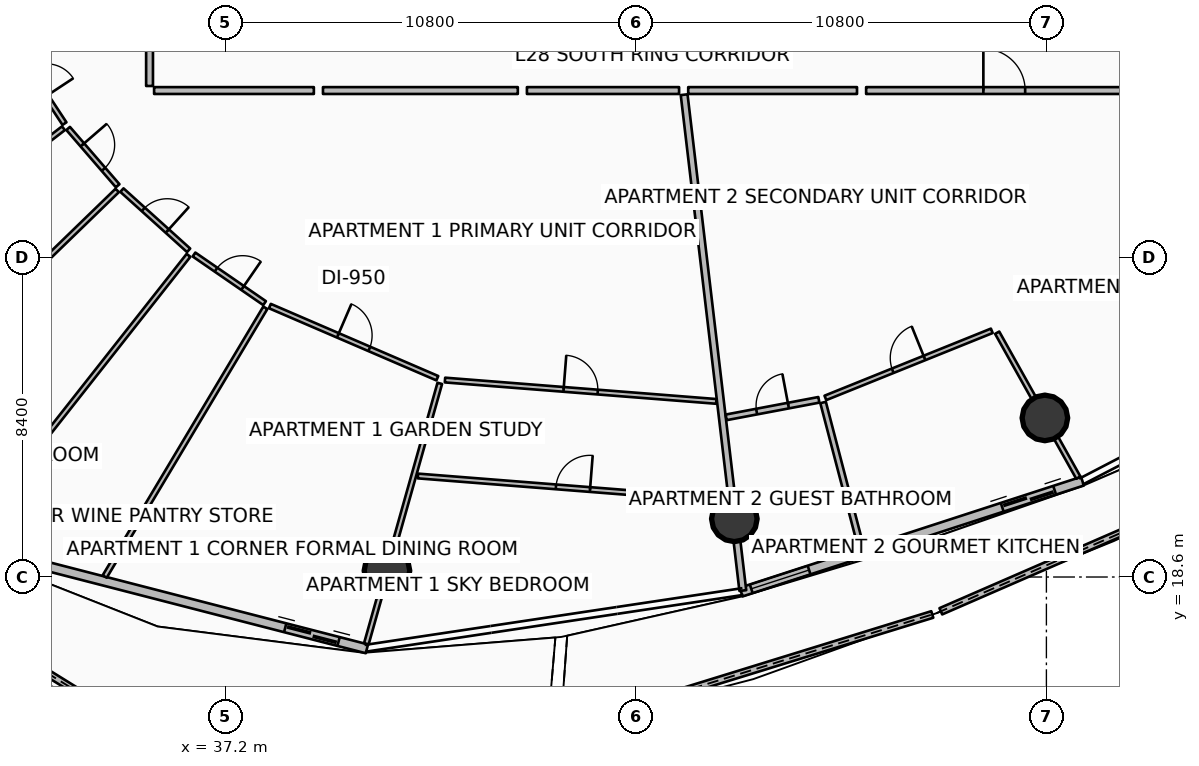
"""IFC4 building model, lengths in metres.
Left out: names, types, materials, properties, quantities, classifications, styles, units other than length and angle.
Written with IfcOpenShell. Run it as: python <this file> out.ifc"""

import sys

from ifc_helpers import new_model, si_unit, direction, frame, frame_2d, origin, origin_2d, place, context, subcontext, project, spatial, polyline, rectangle, circle, outline, extrude, element, fill, save


model = new_model("IFC4")
c1 = context("Model", 3, precision=1e-05, world=origin(), true_north=direction((0.0, 1.0)))
c2 = subcontext(c1, "Body", "Model", "MODEL_VIEW")
j1 = project(units=[si_unit("LENGTHUNIT", "METRE"), si_unit("PLANEANGLEUNIT", "RADIAN")], contexts=[c1])
p1 = place(None, origin())
s1 = spatial("IfcSite", under=j1, at=p1, CompositionType="ELEMENT")
p2 = place(p1, origin())
s2 = spatial("IfcBuilding", under=s1, at=p2, CompositionType="ELEMENT")
p3 = place(p2, frame((0.0, 0.0, 112.65)))
s3 = spatial("IfcBuildingStorey", under=s2, at=p3, CompositionType="ELEMENT", Elevation=112.65)
p4 = place(p3, frame((31.677, 21.294, 0.0), z_axis=(0.198457488994, 0.251703806559, 0.947237994818), x_axis=(-0.785271109582, 0.619152068926, 0.0)))
e1 = element("IfcColumn", 1, at=p4, inside=s3, PredefinedType="COLUMN", context=c2, shape_type="SweptSolid", body=[
    extrude(circle(Radius=0.6, at=origin_2d()), origin(), (0.0, 0.0, 1.0), 3.664),
])
p5 = place(p3, frame((41.447, 18.766, 0.0), z_axis=(0.080372181919, 0.284864280229, 0.955192469727), x_axis=(-0.962426857869, 0.271541052609, 0.0)))
e2 = element("IfcColumn", 2, at=p5, inside=s3, PredefinedType="COLUMN", context=c2, shape_type="SweptSolid", body=[
    extrude(circle(Radius=0.6, at=origin_2d()), origin(), (0.0, 0.0, 1.0), 3.633),
])
for number, where, z_axis, x_axis in (
    (3, (50.588, 20.131, 0.0), (-0.032, 0.27, 0.962), (-0.993, -0.118, 0.0)),
    (4, (58.76, 22.786, 0.0), (-0.133, 0.237, 0.962), (-0.872, -0.489, 0.0)),
):
    element("IfcColumn", number, at=place(p3, frame(where, z_axis=z_axis, x_axis=x_axis)), inside=s3, PredefinedType="COLUMN", context=c2, shape_type="SweptSolid", body=[
        extrude(circle(Radius=0.6, at=origin_2d()), origin(), (0.0, 0.0, 1.0), 3.606),
    ])
p6 = place(p3, frame((24.065, 21.303, 0.0), z_axis=(0.0, 0.0, 1.0), x_axis=(0.850140442318, -0.526556006836, 0.0)))
e5 = element("IfcWall", 5, at=p6, inside=s3, PredefinedType="PARAPET", context=c2, shape_type="SweptSolid", body=[
    extrude(outline(polyline([(0.0, 0.0), (11.852, 0.0), (11.852, 1.832), (5.926, 1.696), (0.0, 1.497), (0.0, 0.0)])), frame((0.0, 0.09, 0.0), z_axis=(0.0, -1.0, 0.0), x_axis=(1.0, 0.0, 0.0)), (0.0, 0.0, 1.0), 0.18),
])
p7 = place(p3, frame((46.011, 14.594, 0.0), z_axis=(0.0, 0.0, 1.0), x_axis=(0.955530222606, 0.294893190301, 0.0)))
e6 = element("IfcWall", 6, at=p7, inside=s3, PredefinedType="PARAPET", context=c2, shape_type="SweptSolid", body=[
    extrude(outline(polyline([(0.0, 0.0), (10.241, 0.0), (10.241, 1.348), (5.121, 1.562), (0.0, 1.747), (0.0, 0.0)])), frame((0.0, 0.09, 0.0), z_axis=(0.0, -1.0, 0.0), x_axis=(1.0, 0.0, 0.0)), (0.0, 0.0, 1.0), 0.18),
])
p8 = place(p3, frame((56.022, 17.698, 0.0), z_axis=(0.0, 0.0, 1.0), x_axis=(0.916910512906, 0.399092860527, 0.0)))
e7 = element("IfcWall", 7, at=p8, inside=s3, PredefinedType="PARAPET", context=c2, shape_type="SweptSolid", body=[
    extrude(outline(polyline([(0.0, 0.0), (9.955, 0.0), (9.955, 1.12), (4.977, 1.182), (0.0, 1.348), (0.0, 0.0)])), frame((0.0, 0.09, 0.0), z_axis=(0.0, -1.0, 0.0), x_axis=(1.0, 0.0, 0.0)), (0.0, 0.0, 1.0), 0.18),
])
p9 = place(p3, frame((30.186, 19.477, 0.0), z_axis=(0.0, 0.0, 1.0), x_axis=(0.968356180858, -0.249572248045, 0.0)))
e8 = element("IfcWall", 8, at=p9, inside=s3, PredefinedType="SOLIDWALL", context=c2, shape_type="SweptSolid", body=[
    extrude(rectangle(XDim=11.084, YDim=0.24, at=frame_2d((5.542, 0.0))), origin(), (0.0, 0.0, 1.0), 2.42),
])
p10 = place(p9, frame((8.865, 0.0, 0.0)))
e9 = element("IfcOpeningElement", 9, at=p10, cuts=e8, PredefinedType="OPENING", context=c2, shape_type="SweptSolid", body=[
    extrude(rectangle(XDim=1.45, YDim=2.15, at=frame_2d((0.725, 1.075))), frame((0.0, 0.13, 0.0), z_axis=(0.0, -1.0, 0.0), x_axis=(1.0, 0.0, 0.0)), (0.0, 0.0, 1.0), 0.26),
])
p11 = place(p9, frame((0.28, 0.0, 0.65)))
e10 = element("IfcOpeningElement", 10, at=p11, cuts=e8, PredefinedType="OPENING", context=c2, shape_type="SweptSolid", body=[
    extrude(rectangle(XDim=1.6, YDim=1.5, at=frame_2d((0.8, 0.75))), frame((0.0, 0.13, 0.0), z_axis=(0.0, -1.0, 0.0), x_axis=(1.0, 0.0, 0.0)), (0.0, 0.0, 1.0), 0.26),
])
p12 = place(p3, frame((50.767, 18.203, 0.0), z_axis=(0.0, 0.0, 1.0), x_axis=(0.951052494852, 0.30902937083, 0.0)))
e11 = element("IfcWall", 11, at=p12, inside=s3, PredefinedType="SOLIDWALL", context=c2, shape_type="SweptSolid", body=[
    extrude(rectangle(XDim=9.444, YDim=0.24, at=frame_2d((4.722, 0.0))), origin(), (0.0, 0.0, 1.0), 2.42),
])
p13 = place(p12, frame((7.224, 0.0, 0.0)))
e12 = element("IfcOpeningElement", 12, at=p13, cuts=e11, PredefinedType="OPENING", context=c2, shape_type="SweptSolid", body=[
    extrude(rectangle(XDim=1.45, YDim=2.15, at=frame_2d((0.725, 1.075))), frame((0.0, 0.13, 0.0), z_axis=(0.0, -1.0, 0.0), x_axis=(1.0, 0.0, 0.0)), (0.0, 0.0, 1.0), 0.26),
])
p14 = place(p12, frame((0.28, 0.0, 0.65)))
e13 = element("IfcOpeningElement", 13, at=p14, cuts=e11, PredefinedType="OPENING", context=c2, shape_type="SweptSolid", body=[
    extrude(rectangle(XDim=1.6, YDim=1.5, at=frame_2d((0.8, 0.75))), frame((0.0, 0.13, 0.0), z_axis=(0.0, -1.0, 0.0), x_axis=(1.0, 0.0, 0.0)), (0.0, 0.0, 1.0), 0.26),
])
p15 = place(p3, frame((49.268, 31.291, 0.0), z_axis=(0.0, 0.0, 1.0), x_axis=(0.117532311618, -0.993069058891, 0.0)))
e14 = element("IfcWall", 14, at=p15, inside=s3, PredefinedType="PARTITIONING", context=c2, shape_type="SweptSolid", body=[
    extrude(rectangle(XDim=13.138, YDim=0.18, at=frame_2d((6.569, 0.0))), origin(), (0.0, 0.0, 1.0), 2.427),
])
p16 = place(p3, frame((35.2, 34.712, 0.0), z_axis=(0.0, 0.0, 1.0), x_axis=(0.0, -1.0, 0.0)))
e15 = element("IfcWall", 15, at=p16, inside=s3, PredefinedType="PARTITIONING", context=c2, shape_type="SweptSolid", body=[
    extrude(rectangle(XDim=3.192, YDim=0.18, at=frame_2d((1.596, 0.0))), origin(), (0.0, 0.0, 1.0), 2.427),
])
p17 = place(p3, frame((35.32, 31.4, 0.0), z_axis=(0.0, 0.0, 1.0), x_axis=(1.0, 0.0, 0.0)))
e16 = element("IfcWall", 16, at=p17, inside=s3, PredefinedType="PARTITIONING", context=c2, shape_type="SweptSolid", body=[
    extrude(rectangle(XDim=4.204, YDim=0.18, at=frame_2d((2.102, 0.0))), origin(), (0.0, 0.0, 1.0), 2.427),
])
p18 = place(p3, frame((32.934, 30.408, 0.0), z_axis=(0.0, 0.0, 1.0), x_axis=(-0.792552954037, -0.609803095308, 0.0)))
e17 = element("IfcWall", 17, at=p18, inside=s3, PredefinedType="PARTITIONING", context=c2, shape_type="SweptSolid", body=[
    extrude(rectangle(XDim=10.094, YDim=0.125, at=frame_2d((5.047, 0.0))), origin(), (0.0, 0.0, 1.0), 2.445),
])
p19 = place(p3, frame((34.349, 28.771, 0.0), z_axis=(0.0, 0.0, 1.0), x_axis=(-0.718111331478, -0.695928240268, 0.0)))
e18 = element("IfcWall", 18, at=p19, inside=s3, PredefinedType="PARTITIONING", context=c2, shape_type="SweptSolid", body=[
    extrude(rectangle(XDim=9.674, YDim=0.125, at=frame_2d((4.837, 0.0))), origin(), (0.0, 0.0, 1.0), 2.445),
])
p20 = place(p3, frame((31.537, 32.689, 0.0), z_axis=(0.0, 0.0, 1.0), x_axis=(0.550619938064, -0.834756062455, 0.0)))
e19 = element("IfcWall", 19, at=p20, inside=s3, PredefinedType="PARTITIONING", context=c2, shape_type="SweptSolid", body=[
    extrude(rectangle(XDim=2.586, YDim=0.125, at=frame_2d((1.293, 0.0))), origin(), (0.0, 0.0, 1.0), 2.427),
])
p21 = place(p20, frame((0.868, 0.0, 0.0)))
e20 = element("IfcOpeningElement", 20, at=p21, cuts=e19, PredefinedType="OPENING", context=c2, shape_type="SweptSolid", body=[
    extrude(rectangle(XDim=0.85, YDim=2.06, at=frame_2d((0.425, 1.03))), frame((0.0, 0.073, 0.0), z_axis=(0.0, -1.0, 0.0), x_axis=(1.0, 0.0, 0.0)), (0.0, 0.0, 1.0), 0.145),
])
p22 = place(p3, frame((33.058, 30.403, 0.0), z_axis=(0.0, 0.0, 1.0), x_axis=(0.653992855141, -0.756500724008, 0.0)))
e21 = element("IfcWall", 21, at=p22, inside=s3, PredefinedType="PARTITIONING", context=c2, shape_type="SweptSolid", body=[
    extrude(rectangle(XDim=1.993, YDim=0.125, at=frame_2d((0.997, 0.0))), origin(), (0.0, 0.0, 1.0), 2.91),
])
p23 = place(p22, frame((0.572, 0.0, 0.0)))
e22 = element("IfcOpeningElement", 22, at=p23, cuts=e21, PredefinedType="OPENING", context=c2, shape_type="SweptSolid", body=[
    extrude(rectangle(XDim=0.85, YDim=2.06, at=frame_2d((0.425, 1.03))), frame((0.0, 0.073, 0.0), z_axis=(0.0, -1.0, 0.0), x_axis=(1.0, 0.0, 0.0)), (0.0, 0.0, 1.0), 0.145),
])
p24 = place(p3, frame((34.473, 28.781, 0.0), z_axis=(0.0, 0.0, 1.0), x_axis=(0.742276601868, -0.670093610117, 0.0)))
e23 = element("IfcWall", 23, at=p24, inside=s3, PredefinedType="PARTITIONING", context=c2, shape_type="SweptSolid", body=[
    extrude(rectangle(XDim=2.364, YDim=0.125, at=frame_2d((1.182, 0.0))), origin(), (0.0, 0.0, 1.0), 2.427),
])
p25 = place(p24, frame((0.757, 0.0, 0.0)))
e24 = element("IfcOpeningElement", 24, at=p25, cuts=e23, PredefinedType="OPENING", context=c2, shape_type="SweptSolid", body=[
    extrude(rectangle(XDim=0.85, YDim=2.06, at=frame_2d((0.425, 1.03))), frame((0.0, 0.073, 0.0), z_axis=(0.0, -1.0, 0.0), x_axis=(1.0, 0.0, 0.0)), (0.0, 0.0, 1.0), 0.145),
])
p26 = place(p3, frame((39.764, 31.4, 0.0), z_axis=(0.0, 0.0, 1.0), x_axis=(1.0, 0.0, 0.0)))
e25 = element("IfcWall", 25, at=p26, inside=s3, PredefinedType="PARTITIONING", context=c2, shape_type="SweptSolid", body=[
    extrude(rectangle(XDim=5.127, YDim=0.18, at=frame_2d((2.563, 0.0))), origin(), (0.0, 0.0, 1.0), 2.427),
])
p27 = place(p3, frame((36.226, 27.064, 0.0), z_axis=(0.0, 0.0, 1.0), x_axis=(-0.619089743422, -0.785320246517, 0.0)))
e26 = element("IfcWall", 26, at=p27, inside=s3, PredefinedType="PARTITIONING", context=c2, shape_type="SweptSolid", body=[
    extrude(rectangle(XDim=9.652, YDim=0.125, at=frame_2d((4.826, 0.0))), origin(), (0.0, 0.0, 1.0), 2.427),
])
p28 = place(p3, frame((38.247, 25.684, 0.0), z_axis=(0.0, 0.0, 1.0), x_axis=(-0.51308300355, -0.858338995658, 0.0)))
e27 = element("IfcWall", 27, at=p28, inside=s3, PredefinedType="PARTITIONING", context=c2, shape_type="SweptSolid", body=[
    extrude(rectangle(XDim=8.238, YDim=0.125, at=frame_2d((4.119, 0.0))), origin(), (0.0, 0.0, 1.0), 2.445),
])
p29 = place(p3, frame((36.37, 27.086, 0.0), z_axis=(0.0, 0.0, 1.0), x_axis=(0.823491864383, -0.567328079065, 0.0)))
e28 = element("IfcWall", 28, at=p29, inside=s3, PredefinedType="PARTITIONING", context=c2, shape_type="SweptSolid", body=[
    extrude(rectangle(XDim=2.255, YDim=0.125, at=frame_2d((1.127, 0.0))), origin(), (0.0, 0.0, 1.0), 2.427),
])
p30 = place(p29, frame((0.702, 0.0, 0.0)))
e29 = element("IfcOpeningElement", 29, at=p30, cuts=e28, PredefinedType="OPENING", context=c2, shape_type="SweptSolid", body=[
    extrude(rectangle(XDim=0.85, YDim=2.06, at=frame_2d((0.425, 1.03))), frame((0.0, 0.073, 0.0), z_axis=(0.0, -1.0, 0.0), x_axis=(1.0, 0.0, 0.0)), (0.0, 0.0, 1.0), 0.145),
])
p31 = place(p3, frame((38.366, 25.729, 0.0), z_axis=(0.0, 0.0, 1.0), x_axis=(0.918374782562, -0.395711711673, 0.0)))
e30 = element("IfcWall", 30, at=p31, inside=s3, PredefinedType="PARTITIONING", context=c2, shape_type="SweptSolid", body=[
    extrude(rectangle(XDim=4.798, YDim=0.125, at=frame_2d((2.399, 0.0))), origin(), (0.0, 0.0, 1.0), 2.427),
])
p32 = place(p31, frame((1.949, 0.0, 0.0)))
e31 = element("IfcOpeningElement", 31, at=p32, cuts=e30, PredefinedType="OPENING", context=c2, shape_type="SweptSolid", body=[
    extrude(rectangle(XDim=0.9, YDim=2.08, at=frame_2d((0.45, 1.04))), frame((0.0, 0.073, 0.0), z_axis=(0.0, -1.0, 0.0), x_axis=(1.0, 0.0, 0.0)), (0.0, 0.0, 1.0), 0.145),
])
p33 = place(p3, frame((45.131, 31.4, 0.0), z_axis=(0.0, 0.0, 1.0), x_axis=(1.0, 0.0, 0.0)))
e32 = element("IfcWall", 32, at=p33, inside=s3, PredefinedType="PARTITIONING", context=c2, shape_type="SweptSolid", body=[
    extrude(rectangle(XDim=4.004, YDim=0.18, at=frame_2d((2.002, 0.0))), origin(), (0.0, 0.0, 1.0), 2.427),
])
p34 = place(p3, frame((42.837, 23.695, 0.0), z_axis=(0.0, 0.0, 1.0), x_axis=(-0.271444688389, -0.962454041056, 0.0)))
e33 = element("IfcWall", 33, at=p34, inside=s3, PredefinedType="PARTITIONING", context=c2, shape_type="SweptSolid", body=[
    extrude(rectangle(XDim=7.119, YDim=0.125, at=frame_2d((3.56, 0.0))), origin(), (0.0, 0.0, 1.0), 2.427),
])
p35 = place(p3, frame((42.974, 23.783, 0.0), z_axis=(0.0, 0.0, 1.0), x_axis=(0.996916140978, -0.078474249642, 0.0)))
e34 = element("IfcWall", 34, at=p35, inside=s3, PredefinedType="PARTITIONING", context=c2, shape_type="SweptSolid", body=[
    extrude(rectangle(XDim=7.162, YDim=0.125, at=frame_2d((3.581, 0.0))), origin(), (0.0, 0.0, 1.0), 2.427),
])
p36 = place(p35, frame((3.131, 0.0, 0.0)))
e35 = element("IfcOpeningElement", 35, at=p36, cuts=e34, PredefinedType="OPENING", context=c2, shape_type="SweptSolid", body=[
    extrude(rectangle(XDim=0.9, YDim=2.08, at=frame_2d((0.45, 1.04))), frame((0.0, 0.073, 0.0), z_axis=(0.0, -1.0, 0.0), x_axis=(1.0, 0.0, 0.0)), (0.0, 0.0, 1.0), 0.145),
])
p37 = place(p3, frame((42.262, 21.258, 0.0), z_axis=(0.0, 0.0, 1.0), x_axis=(0.99691622747, -0.078473150864, 0.0)))
e36 = element("IfcWall", 36, at=p37, inside=s3, PredefinedType="PARTITIONING", context=c2, shape_type="SweptSolid", body=[
    extrude(rectangle(XDim=8.185, YDim=0.125, at=frame_2d((4.093, 0.0))), origin(), (0.0, 0.0, 1.0), 2.427),
])
p38 = place(p37, frame((3.643, 0.0, 0.0)))
e37 = element("IfcOpeningElement", 37, at=p38, cuts=e36, PredefinedType="OPENING", context=c2, shape_type="SweptSolid", body=[
    extrude(rectangle(XDim=0.9, YDim=2.08, at=frame_2d((0.45, 1.04))), frame((0.0, 0.073, 0.0), z_axis=(0.0, -1.0, 0.0), x_axis=(1.0, 0.0, 0.0)), (0.0, 0.0, 1.0), 0.145),
])
p39 = place(p3, frame((54.056, 31.4, 0.0), z_axis=(0.0, 0.0, 1.0), x_axis=(1.0, 0.0, 0.0)))
e38 = element("IfcWall", 38, at=p39, inside=s3, PredefinedType="PARTITIONING", context=c2, shape_type="SweptSolid", body=[
    extrude(rectangle(XDim=7.27, YDim=0.18, at=frame_2d((3.635, 0.0))), origin(), (0.0, 0.0, 1.0), 2.427),
])
p40 = place(p39, frame((3.085, 0.0, 0.0)))
e39 = element("IfcOpeningElement", 39, at=p40, cuts=e38, PredefinedType="OPENING", context=c2, shape_type="SweptSolid", body=[
    extrude(rectangle(XDim=1.1, YDim=2.1, at=frame_2d((0.55, 1.05))), frame((0.0, 0.1, 0.0), z_axis=(0.0, -1.0, 0.0), x_axis=(1.0, 0.0, 0.0)), (0.0, 0.0, 1.0), 0.2),
])
p41 = place(p3, frame((49.375, 31.4, 0.0), z_axis=(0.0, 0.0, 1.0), x_axis=(1.0, 0.0, 0.0)))
e40 = element("IfcWall", 40, at=p41, inside=s3, PredefinedType="PARTITIONING", context=c2, shape_type="SweptSolid", body=[
    extrude(rectangle(XDim=4.442, YDim=0.18, at=frame_2d((2.221, 0.0))), origin(), (0.0, 0.0, 1.0), 2.427),
])
p42 = place(p3, frame((57.505, 25.028, 0.0), z_axis=(0.0, 0.0, 1.0), x_axis=(0.488618677979, -0.872497442707, 0.0)))
e41 = element("IfcWall", 41, at=p42, inside=s3, PredefinedType="PARTITIONING", context=c2, shape_type="SweptSolid", body=[
    extrude(rectangle(XDim=4.37, YDim=0.125, at=frame_2d((2.185, 0.0))), origin(), (0.0, 0.0, 1.0), 2.427),
])
p43 = place(p3, frame((50.373, 22.801, 0.0), z_axis=(0.0, 0.0, 1.0), x_axis=(0.982580437485, 0.185837789137, 0.0)))
e42 = element("IfcWall", 42, at=p43, inside=s3, PredefinedType="PARTITIONING", context=c2, shape_type="SweptSolid", body=[
    extrude(rectangle(XDim=2.483, YDim=0.15, at=frame_2d((1.241, 0.0))), origin(), (0.0, 0.0, 1.0), 2.427),
])
p44 = place(p43, frame((0.816, 0.0, 0.0)))
e43 = element("IfcOpeningElement", 43, at=p44, cuts=e42, PredefinedType="OPENING", context=c2, shape_type="SweptSolid", body=[
    extrude(rectangle(XDim=0.85, YDim=2.06, at=frame_2d((0.425, 1.03))), frame((0.0, 0.085, 0.0), z_axis=(0.0, -1.0, 0.0), x_axis=(1.0, 0.0, 0.0)), (0.0, 0.0, 1.0), 0.17),
])
p45 = place(p3, frame((52.924, 23.192, 0.0), z_axis=(0.0, 0.0, 1.0), x_axis=(0.253254995503, -0.967399559258, 0.0)))
e44 = element("IfcWall", 44, at=p45, inside=s3, PredefinedType="PARTITIONING", context=c2, shape_type="SweptSolid", body=[
    extrude(rectangle(XDim=3.96, YDim=0.15, at=frame_2d((1.98, 0.0))), origin(), (0.0, 0.0, 1.0), 2.445),
])
p46 = place(p3, frame((52.984, 23.312, 0.0), z_axis=(0.0, 0.0, 1.0), x_axis=(0.927438868519, 0.373974792145, 0.0)))
e45 = element("IfcWall", 45, at=p46, inside=s3, PredefinedType="PARTITIONING", context=c2, shape_type="SweptSolid", body=[
    extrude(rectangle(XDim=4.721, YDim=0.125, at=frame_2d((2.361, 0.0))), origin(), (0.0, 0.0, 1.0), 2.427),
])
p47 = place(p46, frame((1.911, 0.0, 0.0)))
e46 = element("IfcOpeningElement", 46, at=p47, cuts=e45, PredefinedType="OPENING", context=c2, shape_type="SweptSolid", body=[
    extrude(rectangle(XDim=0.9, YDim=2.08, at=frame_2d((0.45, 1.04))), frame((0.0, 0.073, 0.0), z_axis=(0.0, -1.0, 0.0), x_axis=(1.0, 0.0, 0.0)), (0.0, 0.0, 1.0), 0.145),
])
p48 = place(p10, origin())
e47 = element("IfcDoor", 47, at=p48, inside=s3, OperationType="DOUBLE_DOOR_SLIDING", PredefinedType="DOOR", context=c2, shape_type="SweptSolid", body=[
    extrude(rectangle(XDim=1.45, YDim=2.15, at=frame_2d((0.725, 1.075))), frame((0.0, 0.025, 0.0), z_axis=(0.0, -1.0, 0.0), x_axis=(1.0, 0.0, 0.0)), (0.0, 0.0, 1.0), 0.05),
])
fill(e9, e47)
p49 = place(p13, origin())
e48 = element("IfcDoor", 48, at=p49, inside=s3, OperationType="DOUBLE_DOOR_SLIDING", PredefinedType="DOOR", context=c2, shape_type="SweptSolid", body=[
    extrude(rectangle(XDim=1.45, YDim=2.15, at=frame_2d((0.725, 1.075))), frame((0.0, 0.025, 0.0), z_axis=(0.0, -1.0, 0.0), x_axis=(1.0, 0.0, 0.0)), (0.0, 0.0, 1.0), 0.05),
])
fill(e12, e48)
p50 = place(p14, origin())
e49 = element("IfcWindow", 49, at=p50, inside=s3, PartitioningType="SINGLE_PANEL", PredefinedType="WINDOW", context=c2, shape_type="SweptSolid", body=[
    extrude(rectangle(XDim=1.6, YDim=1.5, at=frame_2d((0.8, 0.75))), frame((0.0, 0.03, 0.0), z_axis=(0.0, -1.0, 0.0), x_axis=(1.0, 0.0, 0.0)), (0.0, 0.0, 1.0), 0.06),
])
fill(e13, e49)
p51 = place(p23, origin())
e50 = element("IfcDoor", 50, at=p51, inside=s3, OperationType="SINGLE_SWING_LEFT", PredefinedType="DOOR", context=c2, shape_type="SweptSolid", body=[
    extrude(rectangle(XDim=0.85, YDim=2.06, at=frame_2d((0.425, 1.03))), frame((0.0, 0.025, 0.0), z_axis=(0.0, -1.0, 0.0), x_axis=(1.0, 0.0, 0.0)), (0.0, 0.0, 1.0), 0.05),
])
fill(e22, e50)
p52 = place(p25, origin())
e51 = element("IfcDoor", 51, at=p52, inside=s3, OperationType="SINGLE_SWING_RIGHT", PredefinedType="DOOR", context=c2, shape_type="SweptSolid", body=[
    extrude(rectangle(XDim=0.85, YDim=2.06, at=frame_2d((0.425, 1.03))), frame((0.0, 0.025, 0.0), z_axis=(0.0, -1.0, 0.0), x_axis=(1.0, 0.0, 0.0)), (0.0, 0.0, 1.0), 0.05),
])
fill(e24, e51)
p53 = place(p30, origin())
e52 = element("IfcDoor", 52, at=p53, inside=s3, OperationType="SINGLE_SWING_RIGHT", PredefinedType="DOOR", context=c2, shape_type="SweptSolid", body=[
    extrude(rectangle(XDim=0.85, YDim=2.06, at=frame_2d((0.425, 1.03))), frame((0.0, 0.025, 0.0), z_axis=(0.0, -1.0, 0.0), x_axis=(1.0, 0.0, 0.0)), (0.0, 0.0, 1.0), 0.05),
])
fill(e29, e52)
p54 = place(p32, origin())
e53 = element("IfcDoor", 53, at=p54, inside=s3, OperationType="SINGLE_SWING_LEFT", PredefinedType="DOOR", context=c2, shape_type="SweptSolid", body=[
    extrude(rectangle(XDim=0.9, YDim=2.08, at=frame_2d((0.45, 1.04))), frame((0.0, 0.025, 0.0), z_axis=(0.0, -1.0, 0.0), x_axis=(1.0, 0.0, 0.0)), (0.0, 0.0, 1.0), 0.05),
])
fill(e31, e53)
p55 = place(p36, origin())
e54 = element("IfcDoor", 54, at=p55, inside=s3, OperationType="SINGLE_SWING_LEFT", PredefinedType="DOOR", context=c2, shape_type="SweptSolid", body=[
    extrude(rectangle(XDim=0.9, YDim=2.08, at=frame_2d((0.45, 1.04))), frame((0.0, 0.025, 0.0), z_axis=(0.0, -1.0, 0.0), x_axis=(1.0, 0.0, 0.0)), (0.0, 0.0, 1.0), 0.05),
])
fill(e35, e54)
p56 = place(p38, origin())
e55 = element("IfcDoor", 55, at=p56, inside=s3, OperationType="SINGLE_SWING_RIGHT", PredefinedType="DOOR", context=c2, shape_type="SweptSolid", body=[
    extrude(rectangle(XDim=0.9, YDim=2.08, at=frame_2d((0.45, 1.04))), frame((0.0, 0.025, 0.0), z_axis=(0.0, -1.0, 0.0), x_axis=(1.0, 0.0, 0.0)), (0.0, 0.0, 1.0), 0.05),
])
fill(e37, e55)
p57 = place(p40, origin())
e56 = element("IfcDoor", 56, at=p57, inside=s3, OperationType="SINGLE_SWING_LEFT", PredefinedType="DOOR", context=c2, shape_type="SweptSolid", body=[
    extrude(rectangle(XDim=1.1, YDim=2.1, at=frame_2d((0.55, 1.05))), frame((0.0, 0.025, 0.0), z_axis=(0.0, -1.0, 0.0), x_axis=(1.0, 0.0, 0.0)), (0.0, 0.0, 1.0), 0.05),
])
fill(e39, e56)
p58 = place(p44, origin())
e57 = element("IfcDoor", 57, at=p58, inside=s3, OperationType="SINGLE_SWING_RIGHT", PredefinedType="DOOR", context=c2, shape_type="SweptSolid", body=[
    extrude(rectangle(XDim=0.85, YDim=2.06, at=frame_2d((0.425, 1.03))), frame((0.0, 0.025, 0.0), z_axis=(0.0, -1.0, 0.0), x_axis=(1.0, 0.0, 0.0)), (0.0, 0.0, 1.0), 0.05),
])
fill(e43, e57)
p59 = place(p47, origin())
e58 = element("IfcDoor", 58, at=p59, inside=s3, OperationType="SINGLE_SWING_RIGHT", PredefinedType="DOOR", context=c2, shape_type="SweptSolid", body=[
    extrude(rectangle(XDim=0.9, YDim=2.08, at=frame_2d((0.45, 1.04))), frame((0.0, 0.025, 0.0), z_axis=(0.0, -1.0, 0.0), x_axis=(1.0, 0.0, 0.0)), (0.0, 0.0, 1.0), 0.05),
])
fill(e46, e58)
save(model, sys.argv[1])
